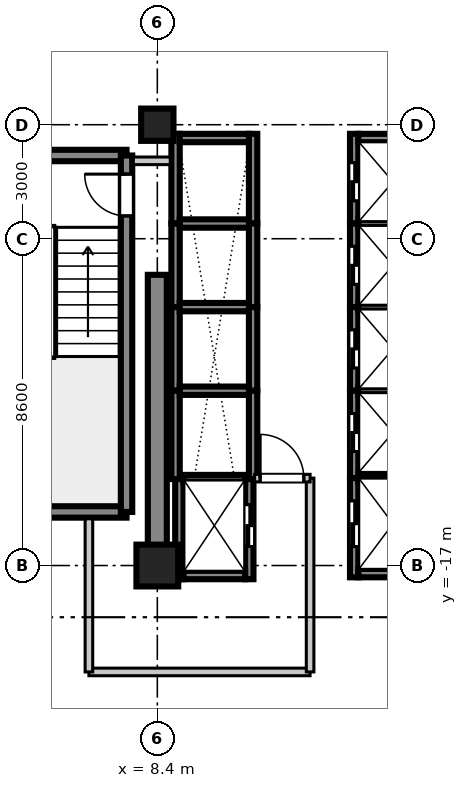
"""IFC4 building model, lengths in metres.
Left out: names, types, materials, properties, quantities, classifications, styles, units other than length and angle.
Written with IfcOpenShell. Run it as: python <this file> out.ifc"""

import sys

from ifc_helpers import new_model, si_unit, direction, frame, frame_2d, origin, origin_2d, place, context, subcontext, project, spatial, rectangle, extrude, source, transform, mapped, element, fill, save


model = new_model("IFC4")
c1 = context("Model", 3, precision=1e-05, world=origin(), true_north=direction((0.0, 1.0)))
c2 = subcontext(c1, "Body", "Model", "MODEL_VIEW")
j1 = project(units=[si_unit("LENGTHUNIT", "METRE"), si_unit("PLANEANGLEUNIT", "RADIAN")], contexts=[c1])
p1 = place(None, origin())
s1 = spatial("IfcSite", under=j1, at=p1, CompositionType="ELEMENT")
p2 = place(p1, origin())
s2 = spatial("IfcBuilding", under=s1, at=p2, CompositionType="ELEMENT")
p3 = place(p2, frame((0.0, 0.0, 192.8)))
s3 = spatial("IfcBuildingStorey", under=s2, at=p3, CompositionType="ELEMENT", Elevation=192.8)
m1 = source(origin(), c2, "Body", "SweptSolid", [
    extrude(rectangle(XDim=1.1, YDim=1.1, at=origin_2d()), origin(), (0.0, 0.0, 1.0), 3.605),
])
p4 = place(p3, frame((8.4, -17.0, 0.0), z_axis=(0.0, 0.0, 1.0), x_axis=(1.0, 0.0, 0.0)))
e1 = element("IfcColumn", 1, at=p4, inside=s3, PredefinedType="COLUMN", context=c2, shape_type="MappedRepresentation", body=[
    mapped(m1, transform((0.0, 0.0, 0.0), scale=1.0)),
])
m2 = source(origin(), c2, "Body", "SweptSolid", [
    extrude(rectangle(XDim=0.85, YDim=0.85, at=origin_2d()), origin(), (0.0, 0.0, 1.0), 3.605),
])
p5 = place(p3, frame((8.4, -5.4, 0.0), z_axis=(0.0, 0.0, 1.0), x_axis=(1.0, 0.0, 0.0)))
e2 = element("IfcColumn", 2, at=p5, inside=s3, PredefinedType="PILASTER", context=c2, shape_type="MappedRepresentation", body=[
    mapped(m2, transform((0.0, 0.0, 0.0), scale=1.0)),
])
m3 = source(origin(), c2, "Body", "SweptSolid", [
    extrude(rectangle(XDim=7.65, YDim=0.5, at=frame_2d((3.825, 0.0))), origin(), (0.0, 0.0, 1.0), 3.39),
])
p6 = place(p3, frame((8.4, -17.0, 0.0), z_axis=(0.0, 0.0, 1.0), x_axis=(0.0, 1.0, 0.0)))
e3 = element("IfcWall", 3, at=p6, inside=s3, PredefinedType="SHEAR", context=c2, shape_type="MappedRepresentation", body=[
    mapped(m3, transform((0.0, 0.0, 0.0), scale=1.0)),
])
m4 = source(origin(), c2, "Body", "SweptSolid", [
    extrude(rectangle(XDim=3.98, YDim=0.3, at=frame_2d((1.99, 0.0))), origin(), (0.0, 0.0, 1.0), 3.39),
])
for number, where, z_axis, x_axis in (
    (4, (3.61, -15.59, 0.0), (0.0, 0.0, 1.0), (1.0, 0.0, 0.0)),
    (5, (3.61, -6.21, 0.0), (0.0, 0.0, 1.0), (1.0, 0.0, 0.0)),
):
    element("IfcWall", number, at=place(p3, frame(where, z_axis=z_axis, x_axis=x_axis)), inside=s3, PredefinedType="SHEAR", context=c2, shape_type="MappedRepresentation", body=[
        mapped(m4, transform((0.0, 0.0, 0.0), scale=1.0)),
    ])
m5 = source(origin(), c2, "Body", "SweptSolid", [
    extrude(rectangle(XDim=9.38, YDim=0.3, at=frame_2d((4.69, 0.0))), origin(), (0.0, 0.0, 1.0), 3.39),
])
p7 = place(p3, frame((7.59, -15.59, 0.0), z_axis=(0.0, 0.0, 1.0), x_axis=(0.0, 1.0, 0.0)))
e6 = element("IfcWall", 6, at=p7, inside=s3, PredefinedType="SHEAR", context=c2, shape_type="MappedRepresentation", body=[
    mapped(m5, transform((0.0, 0.0, 0.0), scale=1.0)),
])
p8 = place(p7, frame((7.79, 0.0, 0.0)))
e7 = element("IfcOpeningElement", 7, at=p8, cuts=e6, PredefinedType="OPENING", context=c2, shape_type="SweptSolid", body=[
    extrude(rectangle(XDim=1.1, YDim=2.15, at=frame_2d((0.55, 1.075))), frame((0.0, 0.16, 0.0), z_axis=(0.0, -1.0, 0.0), x_axis=(1.0, 0.0, 0.0)), (0.0, 0.0, 1.0), 0.32),
])
m6 = source(origin(), c2, "Body", "SweptSolid", [
    extrude(rectangle(XDim=2.36, YDim=0.22, at=frame_2d((1.18, 0.0))), origin(), (0.0, 0.0, 1.0), 3.39),
])
p9 = place(p3, frame((13.58, -8.0, 0.0), z_axis=(0.0, 0.0, 1.0), x_axis=(0.0, 1.0, 0.0)))
e8 = element("IfcWall", 8, at=p9, inside=s3, PredefinedType="SHEAR", context=c2, shape_type="MappedRepresentation", body=[
    mapped(m6, transform((0.0, 0.0, 0.0), scale=1.0)),
])
p10 = place(p9, frame((0.6, 0.0, 0.0)))
e9 = element("IfcOpeningElement", 9, at=p10, cuts=e8, PredefinedType="OPENING", context=c2, shape_type="SweptSolid", body=[
    extrude(rectangle(XDim=1.0, YDim=2.2, at=frame_2d((0.5, 1.1))), frame((0.0, 0.12, 0.0), z_axis=(0.0, -1.0, 0.0), x_axis=(1.0, 0.0, 0.0)), (0.0, 0.0, 1.0), 0.24),
])
m7 = source(origin(), c2, "Body", "SweptSolid", [
    extrude(rectangle(XDim=1.82, YDim=0.22, at=frame_2d((0.91, 0.0))), origin(), (0.0, 0.0, 1.0), 3.39),
])
p11 = place(p3, frame((13.69, -5.75, 0.0), z_axis=(0.0, 0.0, 1.0), x_axis=(1.0, 0.0, 0.0)))
e10 = element("IfcWall", 10, at=p11, inside=s3, PredefinedType="SHEAR", context=c2, shape_type="MappedRepresentation", body=[
    mapped(m7, transform((0.0, 0.0, 0.0), scale=1.0)),
])
m8 = source(origin(), c2, "Body", "SweptSolid", [
    extrude(rectangle(XDim=2.2, YDim=0.22, at=frame_2d((1.1, 0.0))), origin(), (0.0, 0.0, 1.0), 3.39),
])
p12 = place(p3, frame((13.58, -10.2, 0.0), z_axis=(0.0, 0.0, 1.0), x_axis=(0.0, 1.0, 0.0)))
e11 = element("IfcWall", 11, at=p12, inside=s3, PredefinedType="SHEAR", context=c2, shape_type="MappedRepresentation", body=[
    mapped(m8, transform((0.0, 0.0, 0.0), scale=1.0)),
])
p13 = place(p12, frame((0.6, 0.0, 0.0)))
e12 = element("IfcOpeningElement", 12, at=p13, cuts=e11, PredefinedType="OPENING", context=c2, shape_type="SweptSolid", body=[
    extrude(rectangle(XDim=1.0, YDim=2.2, at=frame_2d((0.5, 1.1))), frame((0.0, 0.12, 0.0), z_axis=(0.0, -1.0, 0.0), x_axis=(1.0, 0.0, 0.0)), (0.0, 0.0, 1.0), 0.24),
])
m9 = source(origin(), c2, "Body", "SweptSolid", [
    extrude(rectangle(XDim=1.82, YDim=0.22, at=frame_2d((0.91, 0.0))), origin(), (0.0, 0.0, 1.0), 3.65),
])
p14 = place(p3, frame((13.69, -8.0, 0.0), z_axis=(0.0, 0.0, 1.0), x_axis=(1.0, 0.0, 0.0)))
e13 = element("IfcWall", 13, at=p14, inside=s3, PredefinedType="SHEAR", context=c2, shape_type="MappedRepresentation", body=[
    mapped(m9, transform((0.0, 0.0, 0.0), scale=1.0)),
])
p15 = place(p3, frame((13.58, -12.4, 0.0), z_axis=(0.0, 0.0, 1.0), x_axis=(0.0, 1.0, 0.0)))
e14 = element("IfcWall", 14, at=p15, inside=s3, PredefinedType="SHEAR", context=c2, shape_type="MappedRepresentation", body=[
    mapped(m8, transform((0.0, 0.0, 0.0), scale=1.0)),
])
p16 = place(p15, frame((0.6, 0.0, 0.0)))
e15 = element("IfcOpeningElement", 15, at=p16, cuts=e14, PredefinedType="OPENING", context=c2, shape_type="SweptSolid", body=[
    extrude(rectangle(XDim=1.0, YDim=2.2, at=frame_2d((0.5, 1.1))), frame((0.0, 0.12, 0.0), z_axis=(0.0, -1.0, 0.0), x_axis=(1.0, 0.0, 0.0)), (0.0, 0.0, 1.0), 0.24),
])
p17 = place(p3, frame((13.69, -10.2, 0.0), z_axis=(0.0, 0.0, 1.0), x_axis=(1.0, 0.0, 0.0)))
e16 = element("IfcWall", 16, at=p17, inside=s3, PredefinedType="SHEAR", context=c2, shape_type="MappedRepresentation", body=[
    mapped(m9, transform((0.0, 0.0, 0.0), scale=1.0)),
])
m10 = source(origin(), c2, "Body", "SweptSolid", [
    extrude(rectangle(XDim=2.3, YDim=0.22, at=frame_2d((1.15, 0.0))), origin(), (0.0, 0.0, 1.0), 3.39),
])
p18 = place(p3, frame((13.58, -14.7, 0.0), z_axis=(0.0, 0.0, 1.0), x_axis=(0.0, 1.0, 0.0)))
e17 = element("IfcWall", 17, at=p18, inside=s3, PredefinedType="SHEAR", context=c2, shape_type="MappedRepresentation", body=[
    mapped(m10, transform((0.0, 0.0, 0.0), scale=1.0)),
])
p19 = place(p18, frame((0.7, 0.0, 0.0)))
e18 = element("IfcOpeningElement", 18, at=p19, cuts=e17, PredefinedType="OPENING", context=c2, shape_type="SweptSolid", body=[
    extrude(rectangle(XDim=1.0, YDim=2.2, at=frame_2d((0.5, 1.1))), frame((0.0, 0.12, 0.0), z_axis=(0.0, -1.0, 0.0), x_axis=(1.0, 0.0, 0.0)), (0.0, 0.0, 1.0), 0.24),
])
p20 = place(p3, frame((13.69, -12.4, 0.0), z_axis=(0.0, 0.0, 1.0), x_axis=(1.0, 0.0, 0.0)))
e19 = element("IfcWall", 19, at=p20, inside=s3, PredefinedType="SHEAR", context=c2, shape_type="MappedRepresentation", body=[
    mapped(m9, transform((0.0, 0.0, 0.0), scale=1.0)),
])
for number, where, z_axis, x_axis in (
    (20, (8.88, -8.0, 0.0), (0.0, 0.0, 1.0), (0.0, 1.0, 0.0)),
    (21, (10.92, -8.0, 0.0), (0.0, 0.0, 1.0), (0.0, 1.0, 0.0)),
):
    element("IfcWall", number, at=place(p3, frame(where, z_axis=z_axis, x_axis=x_axis)), inside=s3, PredefinedType="SHEAR", context=c2, shape_type="MappedRepresentation", body=[
        mapped(m6, transform((0.0, 0.0, 0.0), scale=1.0)),
    ])
p21 = place(p3, frame((8.99, -5.75, 0.0), z_axis=(0.0, 0.0, 1.0), x_axis=(1.0, 0.0, 0.0)))
e22 = element("IfcWall", 22, at=p21, inside=s3, PredefinedType="SHEAR", context=c2, shape_type="MappedRepresentation", body=[
    mapped(m7, transform((0.0, 0.0, 0.0), scale=1.0)),
])
for number, where, z_axis, x_axis in (
    (23, (8.88, -10.2, 0.0), (0.0, 0.0, 1.0), (0.0, 1.0, 0.0)),
    (24, (10.92, -10.2, 0.0), (0.0, 0.0, 1.0), (0.0, 1.0, 0.0)),
):
    element("IfcWall", number, at=place(p3, frame(where, z_axis=z_axis, x_axis=x_axis)), inside=s3, PredefinedType="SHEAR", context=c2, shape_type="MappedRepresentation", body=[
        mapped(m8, transform((0.0, 0.0, 0.0), scale=1.0)),
    ])
p22 = place(p3, frame((8.99, -8.0, 0.0), z_axis=(0.0, 0.0, 1.0), x_axis=(1.0, 0.0, 0.0)))
e25 = element("IfcWall", 25, at=p22, inside=s3, PredefinedType="SHEAR", context=c2, shape_type="MappedRepresentation", body=[
    mapped(m9, transform((0.0, 0.0, 0.0), scale=1.0)),
])
for number, where, z_axis, x_axis in (
    (26, (8.88, -12.4, 0.0), (0.0, 0.0, 1.0), (0.0, 1.0, 0.0)),
    (27, (10.92, -12.4, 0.0), (0.0, 0.0, 1.0), (0.0, 1.0, 0.0)),
):
    element("IfcWall", number, at=place(p3, frame(where, z_axis=z_axis, x_axis=x_axis)), inside=s3, PredefinedType="SHEAR", context=c2, shape_type="MappedRepresentation", body=[
        mapped(m8, transform((0.0, 0.0, 0.0), scale=1.0)),
    ])
p23 = place(p3, frame((8.99, -10.2, 0.0), z_axis=(0.0, 0.0, 1.0), x_axis=(1.0, 0.0, 0.0)))
e28 = element("IfcWall", 28, at=p23, inside=s3, PredefinedType="SHEAR", context=c2, shape_type="MappedRepresentation", body=[
    mapped(m9, transform((0.0, 0.0, 0.0), scale=1.0)),
])
m11 = source(origin(), c2, "Body", "SweptSolid", [
    extrude(rectangle(XDim=2.325, YDim=0.22, at=frame_2d((1.163, 0.0))), origin(), (0.0, 0.0, 1.0), 3.39),
])
for number, where, z_axis, x_axis in (
    (29, (8.88, -14.725, 0.0), (0.0, 0.0, 1.0), (0.0, 1.0, 0.0)),
    (30, (10.92, -14.725, 0.0), (0.0, 0.0, 1.0), (0.0, 1.0, 0.0)),
):
    element("IfcWall", number, at=place(p3, frame(where, z_axis=z_axis, x_axis=x_axis)), inside=s3, PredefinedType="SHEAR", context=c2, shape_type="MappedRepresentation", body=[
        mapped(m11, transform((0.0, 0.0, 0.0), scale=1.0)),
    ])
p24 = place(p3, frame((8.99, -12.4, 0.0), z_axis=(0.0, 0.0, 1.0), x_axis=(1.0, 0.0, 0.0)))
e31 = element("IfcWall", 31, at=p24, inside=s3, PredefinedType="SHEAR", context=c2, shape_type="MappedRepresentation", body=[
    mapped(m9, transform((0.0, 0.0, 0.0), scale=1.0)),
])
m12 = source(origin(), c2, "Body", "SweptSolid", [
    extrude(rectangle(XDim=2.635, YDim=0.22, at=frame_2d((1.317, 0.0))), origin(), (0.0, 0.0, 1.0), 3.39),
])
p25 = place(p3, frame((8.98, -17.36, 0.0), z_axis=(0.0, 0.0, 1.0), x_axis=(0.0, 1.0, 0.0)))
e32 = element("IfcWall", 32, at=p25, inside=s3, PredefinedType="SHEAR", context=c2, shape_type="MappedRepresentation", body=[
    mapped(m12, transform((0.0, 0.0, 0.0), scale=1.0)),
])
p26 = place(p3, frame((10.82, -17.36, 0.0), z_axis=(0.0, 0.0, 1.0), x_axis=(0.0, 1.0, 0.0)))
e33 = element("IfcWall", 33, at=p26, inside=s3, PredefinedType="SHEAR", context=c2, shape_type="MappedRepresentation", body=[
    mapped(m12, transform((0.0, 0.0, 0.0), scale=1.0)),
])
p27 = place(p26, frame((0.86, 0.0, 0.0)))
e34 = element("IfcOpeningElement", 34, at=p27, cuts=e33, PredefinedType="OPENING", context=c2, shape_type="SweptSolid", body=[
    extrude(rectangle(XDim=1.1, YDim=2.2, at=frame_2d((0.55, 1.1))), frame((0.0, 0.12, 0.0), z_axis=(0.0, -1.0, 0.0), x_axis=(1.0, 0.0, 0.0)), (0.0, 0.0, 1.0), 0.24),
])
m13 = source(origin(), c2, "Body", "SweptSolid", [
    extrude(rectangle(XDim=1.62, YDim=0.22, at=frame_2d((0.81, 0.0))), origin(), (0.0, 0.0, 1.0), 3.39),
])
p28 = place(p3, frame((9.09, -17.25, 0.0), z_axis=(0.0, 0.0, 1.0), x_axis=(1.0, 0.0, 0.0)))
e35 = element("IfcWall", 35, at=p28, inside=s3, PredefinedType="SHEAR", context=c2, shape_type="MappedRepresentation", body=[
    mapped(m13, transform((0.0, 0.0, 0.0), scale=1.0)),
])
m14 = source(origin(), c2, "Body", "SweptSolid", [
    extrude(rectangle(XDim=1.62, YDim=0.22, at=frame_2d((0.81, 0.0))), origin(), (0.0, 0.0, 1.0), 3.65),
])
p29 = place(p3, frame((9.09, -14.725, 0.0), z_axis=(0.0, 0.0, 1.0), x_axis=(1.0, 0.0, 0.0)))
e36 = element("IfcWall", 36, at=p29, inside=s3, PredefinedType="SHEAR", context=c2, shape_type="MappedRepresentation", body=[
    mapped(m14, transform((0.0, 0.0, 0.0), scale=1.0)),
])
m15 = source(origin(), c2, "Body", "SweptSolid", [
    extrude(rectangle(XDim=2.61, YDim=0.22, at=frame_2d((1.305, 0.0))), origin(), (0.0, 0.0, 1.0), 3.39),
])
p30 = place(p3, frame((13.58, -17.31, 0.0), z_axis=(0.0, 0.0, 1.0), x_axis=(0.0, 1.0, 0.0)))
e37 = element("IfcWall", 37, at=p30, inside=s3, PredefinedType="SHEAR", context=c2, shape_type="MappedRepresentation", body=[
    mapped(m15, transform((0.0, 0.0, 0.0), scale=1.0)),
])
p31 = place(p30, frame((0.81, 0.0, 0.0)))
e38 = element("IfcOpeningElement", 38, at=p31, cuts=e37, PredefinedType="OPENING", context=c2, shape_type="SweptSolid", body=[
    extrude(rectangle(XDim=1.2, YDim=2.2, at=frame_2d((0.6, 1.1))), frame((0.0, 0.12, 0.0), z_axis=(0.0, -1.0, 0.0), x_axis=(1.0, 0.0, 0.0)), (0.0, 0.0, 1.0), 0.24),
])
p32 = place(p3, frame((13.69, -17.2, 0.0), z_axis=(0.0, 0.0, 1.0), x_axis=(1.0, 0.0, 0.0)))
e39 = element("IfcWall", 39, at=p32, inside=s3, PredefinedType="SHEAR", context=c2, shape_type="MappedRepresentation", body=[
    mapped(m7, transform((0.0, 0.0, 0.0), scale=1.0)),
])
p33 = place(p3, frame((13.69, -14.7, 0.0), z_axis=(0.0, 0.0, 1.0), x_axis=(1.0, 0.0, 0.0)))
e40 = element("IfcWall", 40, at=p33, inside=s3, PredefinedType="SHEAR", context=c2, shape_type="MappedRepresentation", body=[
    mapped(m9, transform((0.0, 0.0, 0.0), scale=1.0)),
])
m16 = source(origin(), c2, "Body", "SweptSolid", [
    extrude(rectangle(XDim=5.82, YDim=0.2, at=frame_2d((2.91, 0.0))), origin(), (0.0, 0.0, 1.0), 2.73),
])
p34 = place(p3, frame((6.6, -19.8, 0.0), z_axis=(0.0, 0.0, 1.0), x_axis=(1.0, 0.0, 0.0)))
e41 = element("IfcWall", 41, at=p34, inside=s3, PredefinedType="PARTITIONING", context=c2, shape_type="MappedRepresentation", body=[
    mapped(m16, transform((0.0, 0.0, 0.0), scale=1.0)),
])
m17 = source(origin(), c2, "Body", "SweptSolid", [
    extrude(rectangle(XDim=4.03, YDim=0.2, at=frame_2d((2.015, 0.0))), origin(), (0.0, 0.0, 1.0), 2.73),
])
p35 = place(p3, frame((6.6, -19.8, 0.0), z_axis=(0.0, 0.0, 1.0), x_axis=(0.0, 1.0, 0.0)))
e42 = element("IfcWall", 42, at=p35, inside=s3, PredefinedType="PARTITIONING", context=c2, shape_type="MappedRepresentation", body=[
    mapped(m17, transform((0.0, 0.0, 0.0), scale=1.0)),
])
m18 = source(origin(), c2, "Body", "SweptSolid", [
    extrude(rectangle(XDim=5.1, YDim=0.2, at=frame_2d((2.55, 0.0))), origin(), (0.0, 0.0, 1.0), 2.73),
])
p36 = place(p3, frame((12.42, -19.8, 0.0), z_axis=(0.0, 0.0, 1.0), x_axis=(0.0, 1.0, 0.0)))
e43 = element("IfcWall", 43, at=p36, inside=s3, PredefinedType="PARTITIONING", context=c2, shape_type="MappedRepresentation", body=[
    mapped(m18, transform((0.0, 0.0, 0.0), scale=1.0)),
])
m19 = source(origin(), c2, "Body", "SweptSolid", [
    extrude(rectangle(XDim=1.46, YDim=0.2, at=frame_2d((0.73, 0.0))), origin(), (0.0, 0.0, 1.0), 2.73),
])
p37 = place(p3, frame((10.96, -14.7, 0.0), z_axis=(0.0, 0.0, 1.0), x_axis=(1.0, 0.0, 0.0)))
e44 = element("IfcWall", 44, at=p37, inside=s3, PredefinedType="PARTITIONING", context=c2, shape_type="MappedRepresentation", body=[
    mapped(m19, transform((0.0, 0.0, 0.0), scale=1.0)),
])
p38 = place(p37, frame((0.145, 0.0, 0.0)))
e45 = element("IfcOpeningElement", 45, at=p38, cuts=e44, PredefinedType="OPENING", context=c2, shape_type="SweptSolid", body=[
    extrude(rectangle(XDim=1.15, YDim=2.15, at=frame_2d((0.575, 1.075))), frame((0.0, 0.11, 0.0), z_axis=(0.0, -1.0, 0.0), x_axis=(1.0, 0.0, 0.0)), (0.0, 0.0, 1.0), 0.22),
])
m20 = source(origin(), c2, "Body", "SweptSolid", [
    extrude(rectangle(XDim=0.97, YDim=0.2, at=frame_2d((0.485, 0.0))), origin(), (0.0, 0.0, 1.0), 2.73),
])
p39 = place(p3, frame((7.77, -6.35, 0.0), z_axis=(0.0, 0.0, 1.0), x_axis=(1.0, 0.0, 0.0)))
e46 = element("IfcWall", 46, at=p39, inside=s3, PredefinedType="PARTITIONING", context=c2, shape_type="MappedRepresentation", body=[
    mapped(m20, transform((0.0, 0.0, 0.0), scale=1.0)),
])
m21 = source(origin(), c2, "Body", "SweptSolid", [
    extrude(rectangle(XDim=1.1, YDim=2.15, at=frame_2d((0.55, 1.075))), frame((0.0, 0.025, 0.0), z_axis=(0.0, -1.0, 0.0), x_axis=(1.0, 0.0, 0.0)), (0.0, 0.0, 1.0), 0.05),
])
p40 = place(p8, origin())
e47 = element("IfcDoor", 47, at=p40, inside=s3, OperationType="SINGLE_SWING_RIGHT", PredefinedType="DOOR", context=c2, shape_type="MappedRepresentation", body=[
    mapped(m21, transform((0.0, 0.0, 0.0), scale=1.0)),
])
fill(e7, e47)
m22 = source(origin(), c2, "Body", "SweptSolid", [
    extrude(rectangle(XDim=1.0, YDim=2.2, at=frame_2d((0.5, 1.1))), frame((0.0, 0.025, 0.0), z_axis=(0.0, -1.0, 0.0), x_axis=(1.0, 0.0, 0.0)), (0.0, 0.0, 1.0), 0.05),
])
p41 = place(p10, origin())
e48 = element("IfcDoor", 48, at=p41, inside=s3, OperationType="DOUBLE_DOOR_SLIDING", PredefinedType="DOOR", context=c2, shape_type="MappedRepresentation", body=[
    mapped(m22, transform((0.0, 0.0, 0.0), scale=1.0)),
])
fill(e9, e48)
p42 = place(p13, origin())
e49 = element("IfcDoor", 49, at=p42, inside=s3, OperationType="DOUBLE_DOOR_SLIDING", PredefinedType="DOOR", context=c2, shape_type="MappedRepresentation", body=[
    mapped(m22, transform((0.0, 0.0, 0.0), scale=1.0)),
])
fill(e12, e49)
p43 = place(p16, origin())
e50 = element("IfcDoor", 50, at=p43, inside=s3, OperationType="DOUBLE_DOOR_SLIDING", PredefinedType="DOOR", context=c2, shape_type="MappedRepresentation", body=[
    mapped(m22, transform((0.0, 0.0, 0.0), scale=1.0)),
])
fill(e15, e50)
p44 = place(p19, origin())
e51 = element("IfcDoor", 51, at=p44, inside=s3, OperationType="DOUBLE_DOOR_SLIDING", PredefinedType="DOOR", context=c2, shape_type="MappedRepresentation", body=[
    mapped(m22, transform((0.0, 0.0, 0.0), scale=1.0)),
])
fill(e18, e51)
m23 = source(origin(), c2, "Body", "SweptSolid", [
    extrude(rectangle(XDim=1.1, YDim=2.2, at=frame_2d((0.55, 1.1))), frame((0.0, 0.025, 0.0), z_axis=(0.0, -1.0, 0.0), x_axis=(1.0, 0.0, 0.0)), (0.0, 0.0, 1.0), 0.05),
])
p45 = place(p27, frame((1.1, 0.0, 0.0), z_axis=(0.0, 0.0, 1.0), x_axis=(-1.0, 0.0, 0.0)))
e52 = element("IfcDoor", 52, at=p45, inside=s3, OperationType="DOUBLE_DOOR_SLIDING", PredefinedType="DOOR", context=c2, shape_type="MappedRepresentation", body=[
    mapped(m23, transform((0.0, 0.0, 0.0), scale=1.0)),
])
fill(e34, e52)
m24 = source(origin(), c2, "Body", "SweptSolid", [
    extrude(rectangle(XDim=1.2, YDim=2.2, at=frame_2d((0.6, 1.1))), frame((0.0, 0.025, 0.0), z_axis=(0.0, -1.0, 0.0), x_axis=(1.0, 0.0, 0.0)), (0.0, 0.0, 1.0), 0.05),
])
p46 = place(p31, origin())
e53 = element("IfcDoor", 53, at=p46, inside=s3, OperationType="DOUBLE_DOOR_SLIDING", PredefinedType="DOOR", context=c2, shape_type="MappedRepresentation", body=[
    mapped(m24, transform((0.0, 0.0, 0.0), scale=1.0)),
])
fill(e38, e53)
m25 = source(origin(), c2, "Body", "SweptSolid", [
    extrude(rectangle(XDim=1.15, YDim=2.15, at=frame_2d((0.575, 1.075))), frame((0.0, 0.025, 0.0), z_axis=(0.0, -1.0, 0.0), x_axis=(1.0, 0.0, 0.0)), (0.0, 0.0, 1.0), 0.05),
])
p47 = place(p38, origin())
e54 = element("IfcDoor", 54, at=p47, inside=s3, OperationType="SINGLE_SWING_LEFT", PredefinedType="DOOR", context=c2, shape_type="MappedRepresentation", body=[
    mapped(m25, transform((0.0, 0.0, 0.0), scale=1.0)),
])
fill(e45, e54)
save(model, sys.argv[1])
